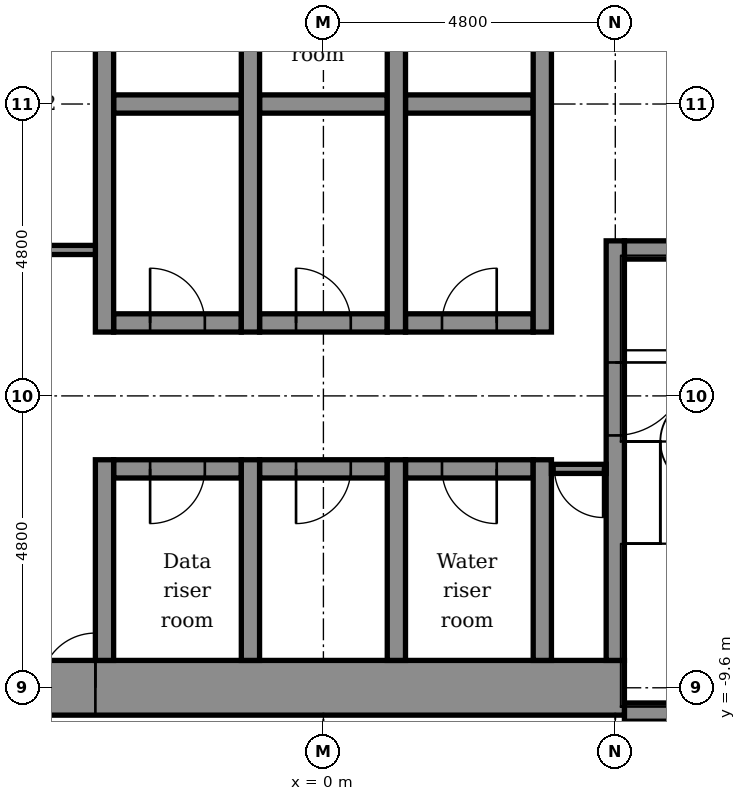
"""IFC4 building model, lengths in metres.
Left out: names, types, materials, properties, quantities, classifications, styles, units other than length and angle.
Written with IfcOpenShell. Run it as: python <this file> out.ifc"""

import sys

from ifc_helpers import new_model, si_unit, direction, frame, frame_2d, origin, place, context, subcontext, project, spatial, rectangle, extrude, element, fill, save


model = new_model("IFC4")
c1 = context("Model", 3, precision=1e-05, world=origin(), true_north=direction((0.0, 1.0)))
c2 = subcontext(c1, "Body", "Model", "MODEL_VIEW")
j1 = project(units=[si_unit("LENGTHUNIT", "METRE"), si_unit("PLANEANGLEUNIT", "RADIAN")], contexts=[c1])
p1 = place(None, origin())
s1 = spatial("IfcSite", under=j1, at=p1, CompositionType="ELEMENT")
p2 = place(p1, origin())
s2 = spatial("IfcBuilding", under=s1, at=p2, CompositionType="ELEMENT")
p3 = place(p2, frame((0.0, 0.0, 109.4)))
s3 = spatial("IfcBuildingStorey", under=s2, at=p3, CompositionType="ELEMENT", Elevation=109.4)
p4 = place(p3, frame((4.95, -10.0, -0.2), z_axis=(0.0, 0.0, 1.0), x_axis=(1.0, 0.0, 0.0)))
e1 = element("IfcWall", 1, at=p4, inside=s3, PredefinedType="STANDARD", context=c2, shape_type="SweptSolid", body=[
    extrude(rectangle(XDim=4.2, YDim=0.3, at=frame_2d((2.1, 0.0))), origin(), (0.0, 0.0, 1.0), 4.5),
])
p5 = place(p3, frame((-5.25, -9.6, -0.2), z_axis=(0.0, 0.0, 1.0), x_axis=(1.0, 0.0, 0.0)))
e2 = element("IfcWall", 2, at=p5, inside=s3, PredefinedType="SHEAR", context=c2, shape_type="SweptSolid", body=[
    extrude(rectangle(XDim=10.2, YDim=0.9, at=frame_2d((5.1, 0.0))), origin(), (0.0, 0.0, 1.0), 4.5),
])
p6 = place(p5, frame((0.6, 0.0, 0.2)))
e3 = element("IfcOpeningElement", 3, at=p6, cuts=e2, PredefinedType="OPENING", context=c2, shape_type="SweptSolid", body=[
    extrude(rectangle(XDim=0.9, YDim=2.1, at=frame_2d((0.45, 1.05))), frame((0.0, 0.46, 0.0), z_axis=(0.0, -1.0, 0.0), x_axis=(1.0, 0.0, 0.0)), (0.0, 0.0, 1.0), 0.92),
])
p7 = place(p3, frame((-3.45, -6.0, -0.2), z_axis=(0.0, 0.0, 1.0), x_axis=(1.0, 0.0, 0.0)))
e4 = element("IfcWall", 4, at=p7, inside=s3, PredefinedType="STANDARD", context=c2, shape_type="SweptSolid", body=[
    extrude(rectangle(XDim=2.1, YDim=0.3, at=frame_2d((1.05, 0.0))), origin(), (0.0, 0.0, 1.0), 4.5),
])
p8 = place(p7, frame((0.6, 0.0, 0.2)))
e5 = element("IfcOpeningElement", 5, at=p8, cuts=e4, PredefinedType="OPENING", context=c2, shape_type="SweptSolid", body=[
    extrude(rectangle(XDim=0.9, YDim=2.1, at=frame_2d((0.45, 1.05))), frame((0.0, 0.16, 0.0), z_axis=(0.0, -1.0, 0.0), x_axis=(1.0, 0.0, 0.0)), (0.0, 0.0, 1.0), 0.32),
])
p9 = place(p3, frame((-1.05, -6.0, -0.2), z_axis=(0.0, 0.0, 1.0), x_axis=(1.0, 0.0, 0.0)))
e6 = element("IfcWall", 6, at=p9, inside=s3, PredefinedType="STANDARD", context=c2, shape_type="SweptSolid", body=[
    extrude(rectangle(XDim=2.1, YDim=0.3, at=frame_2d((1.05, 0.0))), origin(), (0.0, 0.0, 1.0), 4.5),
])
p10 = place(p9, frame((0.6, 0.0, 0.2)))
e7 = element("IfcOpeningElement", 7, at=p10, cuts=e6, PredefinedType="OPENING", context=c2, shape_type="SweptSolid", body=[
    extrude(rectangle(XDim=0.9, YDim=2.1, at=frame_2d((0.45, 1.05))), frame((0.0, 0.16, 0.0), z_axis=(0.0, -1.0, 0.0), x_axis=(1.0, 0.0, 0.0)), (0.0, 0.0, 1.0), 0.32),
])
p11 = place(p3, frame((1.35, -6.0, -0.2), z_axis=(0.0, 0.0, 1.0), x_axis=(1.0, 0.0, 0.0)))
e8 = element("IfcWall", 8, at=p11, inside=s3, PredefinedType="STANDARD", context=c2, shape_type="SweptSolid", body=[
    extrude(rectangle(XDim=2.1, YDim=0.3, at=frame_2d((1.05, 0.0))), origin(), (0.0, 0.0, 1.0), 4.5),
])
p12 = place(p11, frame((0.6, 0.0, 0.2)))
e9 = element("IfcOpeningElement", 9, at=p12, cuts=e8, PredefinedType="OPENING", context=c2, shape_type="SweptSolid", body=[
    extrude(rectangle(XDim=0.9, YDim=2.1, at=frame_2d((0.45, 1.05))), frame((0.0, 0.16, 0.0), z_axis=(0.0, -1.0, 0.0), x_axis=(1.0, 0.0, 0.0)), (0.0, 0.0, 1.0), 0.32),
])
p13 = place(p3, frame((-3.45, -3.6, -0.2), z_axis=(0.0, 0.0, 1.0), x_axis=(1.0, 0.0, 0.0)))
e10 = element("IfcWall", 10, at=p13, inside=s3, PredefinedType="STANDARD", context=c2, shape_type="SweptSolid", body=[
    extrude(rectangle(XDim=2.1, YDim=0.3, at=frame_2d((1.05, 0.0))), origin(), (0.0, 0.0, 1.0), 4.5),
])
p14 = place(p13, frame((0.6, 0.0, 0.2)))
e11 = element("IfcOpeningElement", 11, at=p14, cuts=e10, PredefinedType="OPENING", context=c2, shape_type="SweptSolid", body=[
    extrude(rectangle(XDim=0.9, YDim=2.1, at=frame_2d((0.45, 1.05))), frame((0.0, 0.16, 0.0), z_axis=(0.0, -1.0, 0.0), x_axis=(1.0, 0.0, 0.0)), (0.0, 0.0, 1.0), 0.32),
])
p15 = place(p3, frame((-1.05, -3.6, -0.2), z_axis=(0.0, 0.0, 1.0), x_axis=(1.0, 0.0, 0.0)))
e12 = element("IfcWall", 12, at=p15, inside=s3, PredefinedType="STANDARD", context=c2, shape_type="SweptSolid", body=[
    extrude(rectangle(XDim=2.1, YDim=0.3, at=frame_2d((1.05, 0.0))), origin(), (0.0, 0.0, 1.0), 4.5),
])
p16 = place(p15, frame((0.6, 0.0, 0.2)))
e13 = element("IfcOpeningElement", 13, at=p16, cuts=e12, PredefinedType="OPENING", context=c2, shape_type="SweptSolid", body=[
    extrude(rectangle(XDim=0.9, YDim=2.1, at=frame_2d((0.45, 1.05))), frame((0.0, 0.16, 0.0), z_axis=(0.0, -1.0, 0.0), x_axis=(1.0, 0.0, 0.0)), (0.0, 0.0, 1.0), 0.32),
])
p17 = place(p3, frame((1.35, -3.6, -0.2), z_axis=(0.0, 0.0, 1.0), x_axis=(1.0, 0.0, 0.0)))
e14 = element("IfcWall", 14, at=p17, inside=s3, PredefinedType="STANDARD", context=c2, shape_type="SweptSolid", body=[
    extrude(rectangle(XDim=2.1, YDim=0.3, at=frame_2d((1.05, 0.0))), origin(), (0.0, 0.0, 1.0), 4.5),
])
p18 = place(p17, frame((0.6, 0.0, 0.2)))
e15 = element("IfcOpeningElement", 15, at=p18, cuts=e14, PredefinedType="OPENING", context=c2, shape_type="SweptSolid", body=[
    extrude(rectangle(XDim=0.9, YDim=2.1, at=frame_2d((0.45, 1.05))), frame((0.0, 0.16, 0.0), z_axis=(0.0, -1.0, 0.0), x_axis=(1.0, 0.0, 0.0)), (0.0, 0.0, 1.0), 0.32),
])
p19 = place(p3, frame((4.95, -2.4, -0.2), z_axis=(0.0, 0.0, 1.0), x_axis=(1.0, 0.0, 0.0)))
e16 = element("IfcWall", 16, at=p19, inside=s3, PredefinedType="STANDARD", context=c2, shape_type="SweptSolid", body=[
    extrude(rectangle(XDim=0.9, YDim=0.3, at=frame_2d((0.45, 0.0))), origin(), (0.0, 0.0, 1.0), 4.5),
])
p20 = place(p3, frame((-3.45, 0.0, -0.2), z_axis=(0.0, 0.0, 1.0), x_axis=(1.0, 0.0, 0.0)))
e17 = element("IfcWall", 17, at=p20, inside=s3, PredefinedType="STANDARD", context=c2, shape_type="SweptSolid", body=[
    extrude(rectangle(XDim=2.1, YDim=0.3, at=frame_2d((1.05, 0.0))), origin(), (0.0, 0.0, 1.0), 4.5),
])
p21 = place(p3, frame((-1.05, 0.0, -0.2), z_axis=(0.0, 0.0, 1.0), x_axis=(1.0, 0.0, 0.0)))
e18 = element("IfcWall", 18, at=p21, inside=s3, PredefinedType="STANDARD", context=c2, shape_type="SweptSolid", body=[
    extrude(rectangle(XDim=2.1, YDim=0.3, at=frame_2d((1.05, 0.0))), origin(), (0.0, 0.0, 1.0), 4.5),
])
p22 = place(p3, frame((1.35, 0.0, -0.2), z_axis=(0.0, 0.0, 1.0), x_axis=(1.0, 0.0, 0.0)))
e19 = element("IfcWall", 19, at=p22, inside=s3, PredefinedType="STANDARD", context=c2, shape_type="SweptSolid", body=[
    extrude(rectangle(XDim=2.1, YDim=0.3, at=frame_2d((1.05, 0.0))), origin(), (0.0, 0.0, 1.0), 4.5),
])
p23 = place(p3, frame((-3.6, -9.15, -0.2), z_axis=(0.0, 0.0, 1.0), x_axis=(0.0, 1.0, 0.0)))
e20 = element("IfcWall", 20, at=p23, inside=s3, PredefinedType="STANDARD", context=c2, shape_type="SweptSolid", body=[
    extrude(rectangle(XDim=3.3, YDim=0.3, at=frame_2d((1.65, 0.0))), origin(), (0.0, 0.0, 1.0), 4.5),
])
p24 = place(p3, frame((-3.6, -3.75, -0.2), z_axis=(0.0, 0.0, 1.0), x_axis=(0.0, 1.0, 0.0)))
e21 = element("IfcWall", 21, at=p24, inside=s3, PredefinedType="STANDARD", context=c2, shape_type="SweptSolid", body=[
    extrude(rectangle(XDim=7.5, YDim=0.3, at=frame_2d((3.75, 0.0))), origin(), (0.0, 0.0, 1.0), 4.5),
])
p25 = place(p3, frame((-1.2, -9.15, -0.2), z_axis=(0.0, 0.0, 1.0), x_axis=(0.0, 1.0, 0.0)))
e22 = element("IfcWall", 22, at=p25, inside=s3, PredefinedType="STANDARD", context=c2, shape_type="SweptSolid", body=[
    extrude(rectangle(XDim=3.3, YDim=0.3, at=frame_2d((1.65, 0.0))), origin(), (0.0, 0.0, 1.0), 4.5),
])
p26 = place(p3, frame((-1.2, -3.75, -0.2), z_axis=(0.0, 0.0, 1.0), x_axis=(0.0, 1.0, 0.0)))
e23 = element("IfcWall", 23, at=p26, inside=s3, PredefinedType="STANDARD", context=c2, shape_type="SweptSolid", body=[
    extrude(rectangle(XDim=7.5, YDim=0.3, at=frame_2d((3.75, 0.0))), origin(), (0.0, 0.0, 1.0), 4.5),
])
p27 = place(p3, frame((1.2, -9.15, -0.2), z_axis=(0.0, 0.0, 1.0), x_axis=(0.0, 1.0, 0.0)))
e24 = element("IfcWall", 24, at=p27, inside=s3, PredefinedType="STANDARD", context=c2, shape_type="SweptSolid", body=[
    extrude(rectangle(XDim=3.3, YDim=0.3, at=frame_2d((1.65, 0.0))), origin(), (0.0, 0.0, 1.0), 4.5),
])
p28 = place(p3, frame((1.2, -3.75, -0.2), z_axis=(0.0, 0.0, 1.0), x_axis=(0.0, 1.0, 0.0)))
e25 = element("IfcWall", 25, at=p28, inside=s3, PredefinedType="STANDARD", context=c2, shape_type="SweptSolid", body=[
    extrude(rectangle(XDim=7.5, YDim=0.3, at=frame_2d((3.75, 0.0))), origin(), (0.0, 0.0, 1.0), 4.5),
])
p29 = place(p3, frame((3.6, -9.15, -0.2), z_axis=(0.0, 0.0, 1.0), x_axis=(0.0, 1.0, 0.0)))
e26 = element("IfcWall", 26, at=p29, inside=s3, PredefinedType="STANDARD", context=c2, shape_type="SweptSolid", body=[
    extrude(rectangle(XDim=3.3, YDim=0.3, at=frame_2d((1.65, 0.0))), origin(), (0.0, 0.0, 1.0), 4.5),
])
p30 = place(p3, frame((3.6, -3.75, -0.2), z_axis=(0.0, 0.0, 1.0), x_axis=(0.0, 1.0, 0.0)))
e27 = element("IfcWall", 27, at=p30, inside=s3, PredefinedType="STANDARD", context=c2, shape_type="SweptSolid", body=[
    extrude(rectangle(XDim=7.5, YDim=0.3, at=frame_2d((3.75, 0.0))), origin(), (0.0, 0.0, 1.0), 4.5),
])
p31 = place(p3, frame((4.8, -9.15, -0.2), z_axis=(0.0, 0.0, 1.0), x_axis=(0.0, 1.0, 0.0)))
e28 = element("IfcWall", 28, at=p31, inside=s3, PredefinedType="STANDARD", context=c2, shape_type="SweptSolid", body=[
    extrude(rectangle(XDim=6.9, YDim=0.3, at=frame_2d((3.45, 0.0))), origin(), (0.0, 0.0, 1.0), 4.5),
])
p32 = place(p31, frame((3.7, 0.0, 0.2)))
e29 = element("IfcOpeningElement", 29, at=p32, cuts=e28, PredefinedType="OPENING", context=c2, shape_type="SweptSolid", body=[
    extrude(rectangle(XDim=1.2, YDim=2.1, at=frame_2d((0.6, 1.05))), frame((0.0, 0.16, 0.0), z_axis=(0.0, -1.0, 0.0), x_axis=(1.0, 0.0, 0.0)), (0.0, 0.0, 1.0), 0.32),
])
p33 = place(p3, frame((3.75, -6.0, 0.0), z_axis=(0.0, 0.0, 1.0), x_axis=(1.0, 0.0, 0.0)))
e30 = element("IfcWall", 30, at=p33, inside=s3, PredefinedType="PARTITIONING", context=c2, shape_type="SweptSolid", body=[
    extrude(rectangle(XDim=0.9, YDim=0.15, at=frame_2d((0.45, 0.0))), origin(), (0.0, 0.0, 1.0), 4.3),
])
p34 = place(p33, frame((0.05, 0.0, 0.0)))
e31 = element("IfcOpeningElement", 31, at=p34, cuts=e30, PredefinedType="OPENING", context=c2, shape_type="SweptSolid", body=[
    extrude(rectangle(XDim=0.8, YDim=2.1, at=frame_2d((0.4, 1.05))), frame((0.0, 0.085, 0.0), z_axis=(0.0, -1.0, 0.0), x_axis=(1.0, 0.0, 0.0)), (0.0, 0.0, 1.0), 0.17),
])
p35 = place(p3, frame((-4.95, -2.4, 0.0), z_axis=(0.0, 0.0, 1.0), x_axis=(1.0, 0.0, 0.0)))
e32 = element("IfcWall", 32, at=p35, inside=s3, PredefinedType="PARTITIONING", context=c2, shape_type="SweptSolid", body=[
    extrude(rectangle(XDim=1.2, YDim=0.15, at=frame_2d((0.6, 0.0))), origin(), (0.0, 0.0, 1.0), 4.3),
])
p36 = place(p34, frame((0.8, 0.0, 0.0), z_axis=(0.0, 0.0, 1.0), x_axis=(-1.0, 0.0, 0.0)))
e33 = element("IfcDoor", 33, at=p36, inside=s3, OperationType="SINGLE_SWING_RIGHT", PredefinedType="DOOR", context=c2, shape_type="SweptSolid", body=[
    extrude(rectangle(XDim=0.8, YDim=2.1, at=frame_2d((0.4, 1.05))), frame((0.0, 0.025, 0.0), z_axis=(0.0, -1.0, 0.0), x_axis=(1.0, 0.0, 0.0)), (0.0, 0.0, 1.0), 0.05),
])
fill(e31, e33)
p37 = place(p32, frame((1.2, 0.0, 0.0), z_axis=(0.0, 0.0, 1.0), x_axis=(-1.0, 0.0, 0.0)))
e34 = element("IfcDoor", 34, at=p37, inside=s3, OperationType="SINGLE_SWING_RIGHT", PredefinedType="DOOR", context=c2, shape_type="SweptSolid", body=[
    extrude(rectangle(XDim=1.2, YDim=2.1, at=frame_2d((0.6, 1.05))), frame((0.0, 0.025, 0.0), z_axis=(0.0, -1.0, 0.0), x_axis=(1.0, 0.0, 0.0)), (0.0, 0.0, 1.0), 0.05),
])
fill(e29, e34)
p38 = place(p14, origin())
e35 = element("IfcDoor", 35, at=p38, inside=s3, OperationType="SINGLE_SWING_LEFT", PredefinedType="DOOR", context=c2, shape_type="SweptSolid", body=[
    extrude(rectangle(XDim=0.9, YDim=2.1, at=frame_2d((0.45, 1.05))), frame((0.0, 0.025, 0.0), z_axis=(0.0, -1.0, 0.0), x_axis=(1.0, 0.0, 0.0)), (0.0, 0.0, 1.0), 0.05),
])
fill(e11, e35)
p39 = place(p16, origin())
e36 = element("IfcDoor", 36, at=p39, inside=s3, OperationType="SINGLE_SWING_LEFT", PredefinedType="DOOR", context=c2, shape_type="SweptSolid", body=[
    extrude(rectangle(XDim=0.9, YDim=2.1, at=frame_2d((0.45, 1.05))), frame((0.0, 0.025, 0.0), z_axis=(0.0, -1.0, 0.0), x_axis=(1.0, 0.0, 0.0)), (0.0, 0.0, 1.0), 0.05),
])
fill(e13, e36)
p40 = place(p18, origin())
e37 = element("IfcDoor", 37, at=p40, inside=s3, OperationType="SINGLE_SWING_RIGHT", PredefinedType="DOOR", context=c2, shape_type="SweptSolid", body=[
    extrude(rectangle(XDim=0.9, YDim=2.1, at=frame_2d((0.45, 1.05))), frame((0.0, 0.025, 0.0), z_axis=(0.0, -1.0, 0.0), x_axis=(1.0, 0.0, 0.0)), (0.0, 0.0, 1.0), 0.05),
])
fill(e15, e37)
p41 = place(p8, frame((0.9, 0.0, 0.0), z_axis=(0.0, 0.0, 1.0), x_axis=(-1.0, 0.0, 0.0)))
e38 = element("IfcDoor", 38, at=p41, inside=s3, OperationType="SINGLE_SWING_LEFT", PredefinedType="DOOR", context=c2, shape_type="SweptSolid", body=[
    extrude(rectangle(XDim=0.9, YDim=2.1, at=frame_2d((0.45, 1.05))), frame((0.0, 0.025, 0.0), z_axis=(0.0, -1.0, 0.0), x_axis=(1.0, 0.0, 0.0)), (0.0, 0.0, 1.0), 0.05),
])
fill(e5, e38)
p42 = place(p10, frame((0.9, 0.0, 0.0), z_axis=(0.0, 0.0, 1.0), x_axis=(-1.0, 0.0, 0.0)))
e39 = element("IfcDoor", 39, at=p42, inside=s3, OperationType="SINGLE_SWING_LEFT", PredefinedType="DOOR", context=c2, shape_type="SweptSolid", body=[
    extrude(rectangle(XDim=0.9, YDim=2.1, at=frame_2d((0.45, 1.05))), frame((0.0, 0.025, 0.0), z_axis=(0.0, -1.0, 0.0), x_axis=(1.0, 0.0, 0.0)), (0.0, 0.0, 1.0), 0.05),
])
fill(e7, e39)
p43 = place(p12, frame((0.9, 0.0, 0.0), z_axis=(0.0, 0.0, 1.0), x_axis=(-1.0, 0.0, 0.0)))
e40 = element("IfcDoor", 40, at=p43, inside=s3, OperationType="SINGLE_SWING_RIGHT", PredefinedType="DOOR", context=c2, shape_type="SweptSolid", body=[
    extrude(rectangle(XDim=0.9, YDim=2.1, at=frame_2d((0.45, 1.05))), frame((0.0, 0.025, 0.0), z_axis=(0.0, -1.0, 0.0), x_axis=(1.0, 0.0, 0.0)), (0.0, 0.0, 1.0), 0.05),
])
fill(e9, e40)
p44 = place(p6, origin())
e41 = element("IfcDoor", 41, at=p44, inside=s3, OperationType="SINGLE_SWING_RIGHT", PredefinedType="DOOR", context=c2, shape_type="SweptSolid", body=[
    extrude(rectangle(XDim=0.9, YDim=2.1, at=frame_2d((0.45, 1.05))), frame((0.0, 0.025, 0.0), z_axis=(0.0, -1.0, 0.0), x_axis=(1.0, 0.0, 0.0)), (0.0, 0.0, 1.0), 0.05),
])
fill(e3, e41)
save(model, sys.argv[1])
